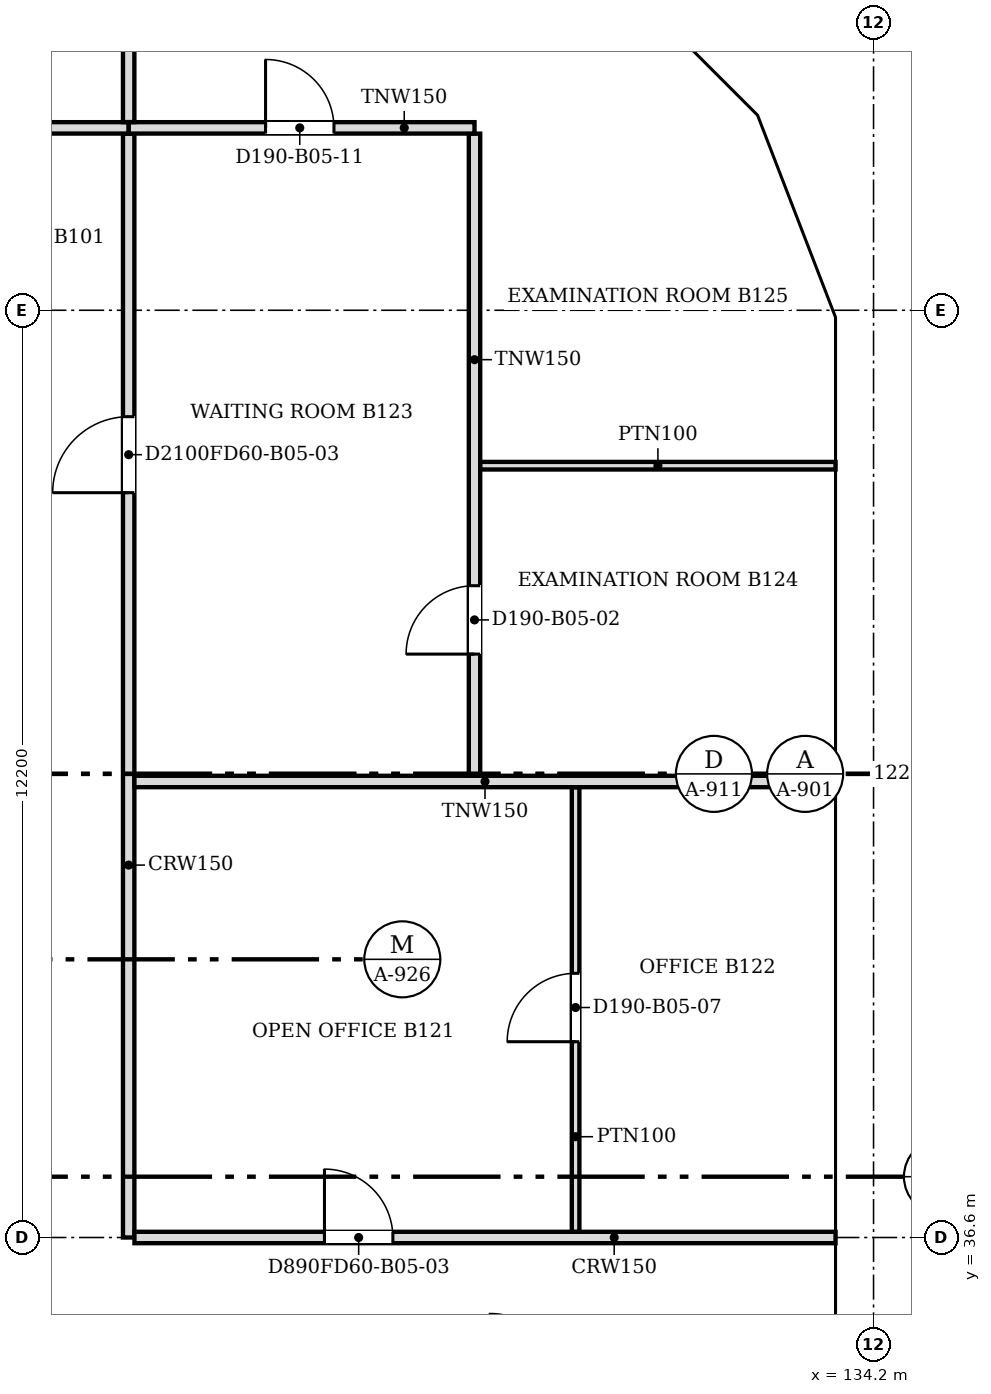
"""IFC4 building model, lengths in metres.
Left out: names, types, materials, properties, quantities, classifications, styles, units other than length and angle.
Written with IfcOpenShell. Run it as: python <this file> out.ifc"""

import sys

from ifc_helpers import new_model, si_unit, direction, frame, frame_2d, origin, place, context, subcontext, project, spatial, polyline, rectangle, outline, extrude, faceted_brep, source, transform, mapped, element, fill, save


model = new_model("IFC4")
c1 = context("Model", 3, precision=1e-05, world=origin(), true_north=direction((0.0, 1.0)))
c2 = subcontext(c1, "Body", "Model", "MODEL_VIEW")
j1 = project(units=[si_unit("LENGTHUNIT", "METRE"), si_unit("PLANEANGLEUNIT", "RADIAN")], contexts=[c1])
p1 = place(None, origin())
s1 = spatial("IfcSite", under=j1, at=p1, CompositionType="ELEMENT")
p2 = place(p1, origin())
s2 = spatial("IfcBuilding", under=s1, at=p2, CompositionType="ELEMENT")
p3 = place(p2, frame((0.0, 0.0, 52.4)))
s3 = spatial("IfcBuildingStorey", under=s2, at=p3, CompositionType="ELEMENT", Elevation=52.4)
m1 = source(origin(), c2, "Body", "Brep", [
    faceted_brep([(3.05, -0.25, 0.0), (6.1, -0.25, 3.8), (6.1, -0.25, 3.8), (3.05, -0.25, 7.6), (0.0, -0.25, 3.8), (0.0, 0.25, 3.8), (3.05, 0.25, 7.6), (6.1, 0.25, 3.8), (6.1, 0.25, 3.8), (3.05, 0.25, 0.0)], [[[0, 1, 2, 3, 4]], [[5, 6, 7, 8, 9]], [[9, 8, 1, 0]], [[7, 6, 3, 2]], [[6, 5, 4, 3]], [[5, 9, 0, 4]], [[1, 8, 7, 2]]]),
])
p4 = place(p3, frame((133.95, 33.55, -3.8), z_axis=(0.0, 0.0, 1.0), x_axis=(0.0, 1.0, 0.0)))
e1 = element("IfcWall", 1, at=p4, inside=s3, PredefinedType="SOLIDWALL", context=c2, shape_type="MappedRepresentation", body=[
    mapped(m1, transform((0.0, 0.0, 0.0), scale=1.0)),
])
m2 = source(origin(), c2, "Body", "SweptSolid", [
    extrude(outline(polyline([(3.05, 0.399), (5.78, 3.8), (3.05, 7.2), (0.321, 3.8), (3.05, 0.399)])), frame((0.0, 0.26, 0.0), z_axis=(0.0, -1.0, 0.0), x_axis=(1.0, 0.0, 0.0)), (0.0, 0.0, 1.0), 0.52),
])
p5 = place(p4, origin())
e2 = element("IfcOpeningElement", 2, at=p5, cuts=e1, PredefinedType="OPENING", context=c2, shape_type="MappedRepresentation", body=[
    mapped(m2, transform((0.0, 0.0, 0.0), scale=1.0)),
])
m3 = source(origin(), c2, "Body", "SweptSolid", [
    extrude(outline(polyline([(3.05, 0.0), (6.1, 3.8), (3.05, 7.6), (0.0, 3.8), (3.05, 0.0)])), frame((0.0, 0.25, 0.0), z_axis=(0.0, -1.0, 0.0), x_axis=(1.0, 0.0, 0.0)), (0.0, 0.0, 1.0), 0.5),
])
p6 = place(p3, frame((133.95, 39.65, -3.8), z_axis=(0.0, 0.0, 1.0), x_axis=(0.0, 1.0, 0.0)))
e3 = element("IfcWall", 3, at=p6, inside=s3, PredefinedType="SOLIDWALL", context=c2, shape_type="MappedRepresentation", body=[
    mapped(m3, transform((0.0, 0.0, 0.0), scale=1.0)),
])
p7 = place(p6, origin())
e4 = element("IfcOpeningElement", 4, at=p7, cuts=e3, PredefinedType="OPENING", context=c2, shape_type="MappedRepresentation", body=[
    mapped(m2, transform((0.0, 0.0, 0.0), scale=1.0)),
])
m4 = source(origin(), c2, "Body", "Brep", [
    faceted_brep([(3.003, -0.25, 0.0), (3.05, -0.25, 0.06), (3.05, -0.25, 7.54), (3.003, -0.25, 7.6), (0.0, -0.25, 3.8), (0.0, 0.25, 3.8), (2.957, 0.25, 7.541), (2.957, 0.25, 0.059), (3.003, 0.0, 0.0), (3.003, 0.0, 7.6)], [[[0, 1, 2, 3, 4]], [[5, 6, 7]], [[1, 0, 8]], [[9, 3, 2]], [[6, 5, 4, 3, 9]], [[5, 7, 8, 0, 4]], [[1, 8, 7, 6, 9, 2]]]),
])
p8 = place(p3, frame((133.95, 45.75, -3.8), z_axis=(0.0, 0.0, 1.0), x_axis=(0.0, 1.0, 0.0)))
e5 = element("IfcWall", 5, at=p8, inside=s3, PredefinedType="SOLIDWALL", context=c2, shape_type="MappedRepresentation", body=[
    mapped(m4, transform((0.0, 0.0, 0.0), scale=1.0)),
])
m5 = source(origin(), c2, "Body", "SweptSolid", [
    extrude(outline(polyline([(2.803, 6.944), (0.319, 3.8), (2.803, 0.656), (2.803, 6.944)])), frame((0.0, 0.26, 0.0), z_axis=(0.0, -1.0, 0.0), x_axis=(1.0, 0.0, 0.0)), (0.0, 0.0, 1.0), 0.52),
])
p9 = place(p8, origin())
e6 = element("IfcOpeningElement", 6, at=p9, cuts=e5, PredefinedType="OPENING", context=c2, shape_type="MappedRepresentation", body=[
    mapped(m5, transform((0.0, 0.0, 0.0), scale=1.0)),
])
m6 = source(origin(), c2, "Body", "Brep", [
    faceted_brep([(0.047, -0.25, 0.0), (2.997, -0.25, 3.8), (0.047, -0.25, 7.6), (0.0, -0.25, 7.541), (0.0, -0.25, 0.059), (0.093, 0.25, 7.54), (2.944, 0.25, 3.868), (2.944, 0.25, 3.732), (0.093, 0.25, 0.06), (2.997, 0.0, 3.8), (0.047, 0.0, 0.0), (0.047, 0.0, 7.6)], [[[0, 1, 2, 3, 4]], [[5, 6, 7, 8]], [[8, 7, 9, 1, 0, 10]], [[6, 5, 11, 2, 1, 9]], [[3, 2, 11]], [[10, 0, 4]], [[8, 10, 4, 3, 11, 5]], [[9, 7, 6]]]),
])
p10 = place(p3, frame((133.967, 48.71, -3.8), z_axis=(0.0, 0.0, 1.0), x_axis=(-0.359901446078, 0.932990326376, 0.0)))
e7 = element("IfcWall", 7, at=p10, inside=s3, PredefinedType="SOLIDWALL", context=c2, shape_type="MappedRepresentation", body=[
    mapped(m6, transform((0.0, 0.0, 0.0), scale=1.0)),
])
m7 = source(origin(), c2, "Body", "SweptSolid", [
    extrude(outline(polyline([(0.247, 0.665), (2.681, 3.8), (0.247, 6.935), (0.247, 0.665)])), frame((0.0, 0.26, 0.0), z_axis=(0.0, -1.0, 0.0), x_axis=(1.0, 0.0, 0.0)), (0.0, 0.0, 1.0), 0.52),
])
p11 = place(p10, origin())
e8 = element("IfcOpeningElement", 8, at=p11, cuts=e7, PredefinedType="OPENING", context=c2, shape_type="MappedRepresentation", body=[
    mapped(m7, transform((0.0, 0.0, 0.0), scale=1.0)),
])
m8 = source(origin(), c2, "Body", "Brep", [
    faceted_brep([(2.944, -0.25, 0.0), (2.997, -0.25, 0.068), (2.997, -0.25, 7.532), (2.944, -0.25, 7.6), (0.0, -0.25, 3.8), (0.053, 0.25, 3.868), (2.891, 0.25, 7.532), (2.891, 0.25, 0.068), (0.053, 0.25, 3.731), (2.944, 0.0, 0.0), (2.944, 0.0, 7.6), (0.0, 0.0, 3.8)], [[[0, 1, 2, 3, 4]], [[5, 6, 7, 8]], [[1, 0, 9]], [[10, 3, 2]], [[6, 5, 11, 4, 3, 10]], [[8, 7, 9, 0, 4, 11]], [[8, 11, 5]], [[1, 9, 7, 6, 10, 2]]]),
])
p12 = place(p3, frame((132.888, 51.506, -3.8), z_axis=(0.0, 0.0, 1.0), x_axis=(-0.707147509625, 0.707066050402, 0.0)))
e9 = element("IfcWall", 9, at=p12, inside=s3, PredefinedType="SOLIDWALL", context=c2, shape_type="MappedRepresentation", body=[
    mapped(m8, transform((0.0, 0.0, 0.0), scale=1.0)),
])
m9 = source(origin(), c2, "Body", "SweptSolid", [
    extrude(outline(polyline([(2.744, 6.934), (0.316, 3.8), (2.744, 0.666), (2.744, 6.934)])), frame((0.0, 0.26, 0.0), z_axis=(0.0, -1.0, 0.0), x_axis=(1.0, 0.0, 0.0)), (0.0, 0.0, 1.0), 0.52),
])
p13 = place(p12, origin())
e10 = element("IfcOpeningElement", 10, at=p13, cuts=e9, PredefinedType="OPENING", context=c2, shape_type="MappedRepresentation", body=[
    mapped(m9, transform((0.0, 0.0, 0.0), scale=1.0)),
])
p14 = place(p2, frame((0.0, 0.0, 56.2)))
s4 = spatial("IfcBuildingStorey", under=s2, at=p14, CompositionType="ELEMENT", Elevation=56.2)
m10 = source(origin(), c2, "Body", "SweptSolid", [
    extrude(outline(polyline([(3.05, 0.0), (6.1, 3.8), (3.05, 7.6), (0.0, 3.8), (3.05, 0.0)])), frame((0.0, 0.25, 0.0), z_axis=(0.0, -1.0, 0.0), x_axis=(1.0, 0.0, 0.0)), (0.0, 0.0, 1.0), 0.5),
])
p15 = place(p14, frame((133.95, 30.5, -3.8), z_axis=(0.0, 0.0, 1.0), x_axis=(0.0, 1.0, 0.0)))
e11 = element("IfcWall", 11, at=p15, inside=s4, PredefinedType="SOLIDWALL", context=c2, shape_type="MappedRepresentation", body=[
    mapped(m10, transform((0.0, 0.0, 0.0), scale=1.0)),
])
m11 = source(origin(), c2, "Body", "SweptSolid", [
    extrude(outline(polyline([(3.05, 0.399), (5.78, 3.8), (3.05, 7.201), (0.321, 3.8), (3.05, 0.399)])), frame((0.0, 0.26, 0.0), z_axis=(0.0, -1.0, 0.0), x_axis=(1.0, 0.0, 0.0)), (0.0, 0.0, 1.0), 0.52),
])
p16 = place(p15, origin())
e12 = element("IfcOpeningElement", 12, at=p16, cuts=e11, PredefinedType="OPENING", context=c2, shape_type="MappedRepresentation", body=[
    mapped(m11, transform((0.0, 0.0, 0.0), scale=1.0)),
])
m12 = source(origin(), c2, "Body", "Brep", [
    faceted_brep([(3.05, -0.25, 0.0), (6.1, -0.25, 3.8), (6.1, -0.25, 3.8), (3.05, -0.25, 7.6), (0.0, -0.25, 3.8), (0.0, 0.25, 3.8), (3.05, 0.25, 7.6), (6.1, 0.25, 3.8), (6.1, 0.25, 3.8), (3.05, 0.25, 0.0)], [[[0, 1, 2, 3, 4]], [[5, 6, 7, 8, 9]], [[9, 8, 1, 0]], [[7, 6, 3, 2]], [[6, 5, 4, 3]], [[5, 9, 0, 4]], [[1, 8, 7, 2]]]),
])
p17 = place(p14, frame((133.95, 36.6, -3.8), z_axis=(0.0, 0.0, 1.0), x_axis=(0.0, 1.0, 0.0)))
e13 = element("IfcWall", 13, at=p17, inside=s4, PredefinedType="SOLIDWALL", context=c2, shape_type="MappedRepresentation", body=[
    mapped(m12, transform((0.0, 0.0, 0.0), scale=1.0)),
])
p18 = place(p17, origin())
e14 = element("IfcOpeningElement", 14, at=p18, cuts=e13, PredefinedType="OPENING", context=c2, shape_type="MappedRepresentation", body=[
    mapped(m11, transform((0.0, 0.0, 0.0), scale=1.0)),
])
m13 = source(origin(), c2, "Body", "Brep", [
    faceted_brep([(3.05, -0.25, 0.0), (6.053, -0.25, 3.8), (3.05, -0.25, 7.6), (0.0, -0.25, 3.8), (0.0, 0.25, 3.8), (3.05, 0.25, 7.6), (6.007, 0.25, 3.859), (6.007, 0.25, 3.741), (3.05, 0.25, 0.0), (6.053, 0.0, 3.8)], [[[0, 1, 2, 3]], [[4, 5, 6, 7, 8]], [[8, 7, 9, 1, 0]], [[6, 5, 2, 1, 9]], [[5, 4, 3, 2]], [[4, 8, 0, 3]], [[9, 7, 6]]]),
])
p19 = place(p14, frame((133.95, 42.7, -3.8), z_axis=(0.0, 0.0, 1.0), x_axis=(0.0, 1.0, 0.0)))
e15 = element("IfcWall", 15, at=p19, inside=s4, PredefinedType="SOLIDWALL", context=c2, shape_type="MappedRepresentation", body=[
    mapped(m13, transform((0.0, 0.0, 0.0), scale=1.0)),
])
m14 = source(origin(), c2, "Body", "SweptSolid", [
    extrude(outline(polyline([(3.049, 0.401), (5.735, 3.8), (3.049, 7.199), (0.321, 3.8), (3.049, 0.401)])), frame((0.0, 0.26, 0.0), z_axis=(0.0, -1.0, 0.0), x_axis=(1.0, 0.0, 0.0)), (0.0, 0.0, 1.0), 0.52),
])
p20 = place(p19, origin())
e16 = element("IfcOpeningElement", 16, at=p20, cuts=e15, PredefinedType="OPENING", context=c2, shape_type="MappedRepresentation", body=[
    mapped(m14, transform((0.0, 0.0, 0.0), scale=1.0)),
])
m15 = source(origin(), c2, "Body", "Brep", [
    faceted_brep([(2.95, -0.25, 0.0), (3.003, -0.25, 0.068), (3.003, -0.25, 7.532), (2.95, -0.25, 7.6), (0.0, -0.25, 3.8), (0.047, 0.25, 3.86), (2.898, 0.25, 7.532), (2.898, 0.25, 0.068), (0.047, 0.25, 3.74), (2.95, 0.0, 0.0), (2.95, 0.0, 7.6), (0.0, 0.0, 3.8)], [[[0, 1, 2, 3, 4]], [[5, 6, 7, 8]], [[1, 0, 9]], [[10, 3, 2]], [[6, 5, 11, 4, 3, 10]], [[8, 7, 9, 0, 4, 11]], [[8, 11, 5]], [[1, 9, 7, 6, 10, 2]]]),
])
p21 = place(p14, frame((133.95, 48.753, -3.8), z_axis=(0.0, 0.0, 1.0), x_axis=(-0.359855894603, 0.933007896601, 0.0)))
e17 = element("IfcWall", 17, at=p21, inside=s4, PredefinedType="SOLIDWALL", context=c2, shape_type="MappedRepresentation", body=[
    mapped(m15, transform((0.0, 0.0, 0.0), scale=1.0)),
])
m16 = source(origin(), c2, "Body", "SweptSolid", [
    extrude(outline(polyline([(2.75, 6.935), (0.316, 3.8), (2.75, 0.665), (2.75, 6.935)])), frame((0.0, 0.26, 0.0), z_axis=(0.0, -1.0, 0.0), x_axis=(1.0, 0.0, 0.0)), (0.0, 0.0, 1.0), 0.52),
])
p22 = place(p21, origin())
e18 = element("IfcOpeningElement", 18, at=p22, cuts=e17, PredefinedType="OPENING", context=c2, shape_type="MappedRepresentation", body=[
    mapped(m16, transform((0.0, 0.0, 0.0), scale=1.0)),
])
m17 = source(origin(), c2, "Body", "Brep", [
    faceted_brep([(0.053, -0.25, 0.0), (2.997, -0.25, 3.8), (0.053, -0.25, 7.6), (0.0, -0.25, 7.532), (0.0, -0.25, 0.068), (0.106, 0.25, 7.532), (2.944, 0.25, 3.868), (2.944, 0.25, 3.732), (0.106, 0.25, 0.068), (2.997, 0.0, 3.8), (0.053, 0.0, 0.0), (0.053, 0.0, 7.6)], [[[0, 1, 2, 3, 4]], [[5, 6, 7, 8]], [[8, 7, 9, 1, 0, 10]], [[6, 5, 11, 2, 1, 9]], [[3, 2, 11]], [[10, 0, 4]], [[8, 10, 4, 3, 11, 5]], [[9, 7, 6]]]),
])
p23 = place(p14, frame((132.926, 51.469, -3.8), z_axis=(0.0, 0.0, 1.0), x_axis=(-0.707066050402, 0.707147509625, 0.0)))
e19 = element("IfcWall", 19, at=p23, inside=s4, PredefinedType="SOLIDWALL", context=c2, shape_type="MappedRepresentation", body=[
    mapped(m17, transform((0.0, 0.0, 0.0), scale=1.0)),
])
m18 = source(origin(), c2, "Body", "SweptSolid", [
    extrude(outline(polyline([(0.253, 0.667), (2.681, 3.8), (0.253, 6.934), (0.253, 0.667)])), frame((0.0, 0.26, 0.0), z_axis=(0.0, -1.0, 0.0), x_axis=(1.0, 0.0, 0.0)), (0.0, 0.0, 1.0), 0.52),
])
p24 = place(p23, origin())
e20 = element("IfcOpeningElement", 20, at=p24, cuts=e19, PredefinedType="OPENING", context=c2, shape_type="MappedRepresentation", body=[
    mapped(m18, transform((0.0, 0.0, 0.0), scale=1.0)),
])
p25 = place(p3, frame((124.4, 51.124, 0.0), z_axis=(0.0, 0.0, 1.0), x_axis=(0.0, -1.0, 0.0)))
e21 = element("IfcWall", 21, at=p25, inside=s3, PredefinedType="PARTITIONING", context=c2, shape_type="SweptSolid", body=[
    extrude(rectangle(XDim=14.524, YDim=0.15, at=frame_2d((7.262, 0.0))), origin(), (0.0, 0.0, 1.0), 3.067),
])
m19 = source(origin(), c2, "Body", "SweptSolid", [
    extrude(rectangle(XDim=1.0, YDim=2.1, at=frame_2d((0.5, 1.05))), frame((0.0, 0.085, 0.0), z_axis=(0.0, -1.0, 0.0), x_axis=(1.0, 0.0, 0.0)), (0.0, 0.0, 1.0), 0.17),
])
p26 = place(p25, frame((3.724, 0.0, 0.0)))
e22 = element("IfcOpeningElement", 22, at=p26, cuts=e21, PredefinedType="OPENING", context=c2, shape_type="MappedRepresentation", body=[
    mapped(m19, transform((0.0, 0.0, 0.0), scale=1.0)),
])
p27 = place(p3, frame((124.476, 36.6, 0.0), z_axis=(0.0, 0.0, 1.0), x_axis=(1.0, 0.0, 0.0)))
e23 = element("IfcWall", 23, at=p27, inside=s3, PredefinedType="PARTITIONING", context=c2, shape_type="SweptSolid", body=[
    extrude(rectangle(XDim=9.224, YDim=0.15, at=frame_2d((4.612, 0.0))), origin(), (0.0, 0.0, 1.0), 3.067),
])
m20 = source(origin(), c2, "Body", "SweptSolid", [
    extrude(rectangle(XDim=0.9, YDim=2.1, at=frame_2d((0.45, 1.05))), frame((0.0, 0.085, 0.0), z_axis=(0.0, -1.0, 0.0), x_axis=(1.0, 0.0, 0.0)), (0.0, 0.0, 1.0), 0.17),
])
p28 = place(p27, frame((2.5, 0.0, 0.0)))
e24 = element("IfcOpeningElement", 24, at=p28, cuts=e23, PredefinedType="OPENING", context=c2, shape_type="MappedRepresentation", body=[
    mapped(m20, transform((0.0, 0.0, 0.0), scale=1.0)),
])
p29 = place(p3, frame((130.28, 42.524, 0.0), z_axis=(0.0, 0.0, 1.0), x_axis=(0.0, -1.0, 0.0)))
e25 = element("IfcWall", 25, at=p29, inside=s3, PredefinedType="PARTITIONING", context=c2, shape_type="SweptSolid", body=[
    extrude(rectangle(XDim=5.848, YDim=0.1, at=frame_2d((2.924, 0.0))), origin(), (0.0, 0.0, 1.0), 3.067),
])
m21 = source(origin(), c2, "Body", "SweptSolid", [
    extrude(rectangle(XDim=0.9, YDim=2.1, at=frame_2d((0.45, 1.05))), frame((0.0, 0.06, 0.0), z_axis=(0.0, -1.0, 0.0), x_axis=(1.0, 0.0, 0.0)), (0.0, 0.0, 1.0), 0.12),
])
p30 = place(p29, frame((2.448, 0.0, 0.0)))
e26 = element("IfcOpeningElement", 26, at=p30, cuts=e25, PredefinedType="OPENING", context=c2, shape_type="MappedRepresentation", body=[
    mapped(m21, transform((0.0, 0.0, 0.0), scale=1.0)),
])
p31 = place(p3, frame((124.476, 42.6, 0.0), z_axis=(0.0, 0.0, 1.0), x_axis=(1.0, 0.0, 0.0)))
e27 = element("IfcWall", 27, at=p31, inside=s3, PredefinedType="PARTITIONING", context=c2, shape_type="SweptSolid", body=[
    extrude(rectangle(XDim=9.224, YDim=0.15, at=frame_2d((4.612, 0.0))), origin(), (0.0, 0.0, 1.0), 3.067),
])
p32 = place(p3, frame((128.95, 51.124, 0.0), z_axis=(0.0, 0.0, 1.0), x_axis=(0.0, -1.0, 0.0)))
e28 = element("IfcWall", 28, at=p32, inside=s3, PredefinedType="PARTITIONING", context=c2, shape_type="SweptSolid", body=[
    extrude(rectangle(XDim=8.448, YDim=0.15, at=frame_2d((4.224, 0.0))), origin(), (0.0, 0.0, 1.0), 3.067),
])
p33 = place(p32, frame((5.948, 0.0, 0.0)))
e29 = element("IfcOpeningElement", 29, at=p33, cuts=e28, PredefinedType="OPENING", context=c2, shape_type="MappedRepresentation", body=[
    mapped(m20, transform((0.0, 0.0, 0.0), scale=1.0)),
])
p34 = place(p3, frame((129.026, 46.755, 0.0), z_axis=(0.0, 0.0, 1.0), x_axis=(1.0, 0.0, 0.0)))
e30 = element("IfcWall", 30, at=p34, inside=s3, PredefinedType="PARTITIONING", context=c2, shape_type="SweptSolid", body=[
    extrude(rectangle(XDim=4.674, YDim=0.1, at=frame_2d((2.337, 0.0))), origin(), (0.0, 0.0, 1.0), 3.067),
])
p35 = place(p3, frame((108.5, 51.2, 0.0), z_axis=(0.0, 0.0, 1.0), x_axis=(1.0, 0.0, 0.0)))
e31 = element("IfcWall", 31, at=p35, inside=s3, PredefinedType="PARTITIONING", context=c2, shape_type="SweptSolid", body=[
    extrude(rectangle(XDim=15.9, YDim=0.15, at=frame_2d((7.95, 0.0))), origin(), (0.0, 0.0, 1.0), 3.067),
])
p36 = place(p35, frame((7.4, 0.0, 0.0)))
e32 = element("IfcOpeningElement", 32, at=p36, cuts=e31, PredefinedType="OPENING", context=c2, shape_type="MappedRepresentation", body=[
    mapped(m19, transform((0.0, 0.0, 0.0), scale=1.0)),
])
p37 = place(p3, frame((124.401, 51.2, 0.0), z_axis=(0.0, 0.0, 1.0), x_axis=(1.0, 0.0, 0.0)))
e33 = element("IfcWall", 33, at=p37, inside=s3, PredefinedType="PARTITIONING", context=c2, shape_type="SweptSolid", body=[
    extrude(rectangle(XDim=4.549, YDim=0.15, at=frame_2d((2.274, 0.0))), origin(), (0.0, 0.0, 1.0), 3.067),
])
p38 = place(p37, frame((1.8, 0.0, 0.0)))
e34 = element("IfcOpeningElement", 34, at=p38, cuts=e33, PredefinedType="OPENING", context=c2, shape_type="MappedRepresentation", body=[
    mapped(m20, transform((0.0, 0.0, 0.0), scale=1.0)),
])
p39 = place(p3, frame((124.4, 51.276, 0.0), z_axis=(0.0, 0.0, 1.0), x_axis=(0.0, 1.0, 0.0)))
e35 = element("IfcWall", 35, at=p39, inside=s3, PredefinedType="PARTITIONING", context=c2, shape_type="SweptSolid", body=[
    extrude(rectangle(XDim=3.124, YDim=0.15, at=frame_2d((1.562, 0.0))), origin(), (0.0, 0.0, 1.0), 3.067),
])
m22 = source(origin(), c2, "Body", "SweptSolid", [
    extrude(rectangle(XDim=0.9, YDim=2.1, at=frame_2d((0.45, 1.05))), frame((0.0, 0.025, 0.0), z_axis=(0.0, -1.0, 0.0), x_axis=(1.0, 0.0, 0.0)), (0.0, 0.0, 1.0), 0.05),
])
p40 = place(p33, origin())
e36 = element("IfcDoor", 36, at=p40, inside=s3, OperationType="SINGLE_SWING_RIGHT", PredefinedType="DOOR", context=c2, shape_type="MappedRepresentation", body=[
    mapped(m22, transform((0.0, 0.0, 0.0), scale=1.0)),
])
fill(e29, e36)
p41 = place(p30, origin())
e37 = element("IfcDoor", 37, at=p41, inside=s3, OperationType="SINGLE_SWING_RIGHT", PredefinedType="DOOR", context=c2, shape_type="MappedRepresentation", body=[
    mapped(m22, transform((0.0, 0.0, 0.0), scale=1.0)),
])
fill(e26, e37)
m23 = source(origin(), c2, "Body", "SweptSolid", [
    extrude(rectangle(XDim=1.0, YDim=2.1, at=frame_2d((0.5, 1.05))), frame((0.0, 0.025, 0.0), z_axis=(0.0, -1.0, 0.0), x_axis=(1.0, 0.0, 0.0)), (0.0, 0.0, 1.0), 0.05),
])
p42 = place(p26, origin())
e38 = element("IfcDoor", 38, at=p42, inside=s3, OperationType="SINGLE_SWING_RIGHT", PredefinedType="DOOR", context=c2, shape_type="MappedRepresentation", body=[
    mapped(m23, transform((0.0, 0.0, 0.0), scale=1.0)),
])
fill(e22, e38)
p43 = place(p38, origin())
e39 = element("IfcDoor", 39, at=p43, inside=s3, OperationType="SINGLE_SWING_LEFT", PredefinedType="DOOR", context=c2, shape_type="MappedRepresentation", body=[
    mapped(m22, transform((0.0, 0.0, 0.0), scale=1.0)),
])
fill(e34, e39)
p44 = place(p28, origin())
e40 = element("IfcDoor", 40, at=p44, inside=s3, OperationType="SINGLE_SWING_LEFT", PredefinedType="DOOR", context=c2, shape_type="MappedRepresentation", body=[
    mapped(m22, transform((0.0, 0.0, 0.0), scale=1.0)),
])
fill(e24, e40)
save(model, sys.argv[1])
